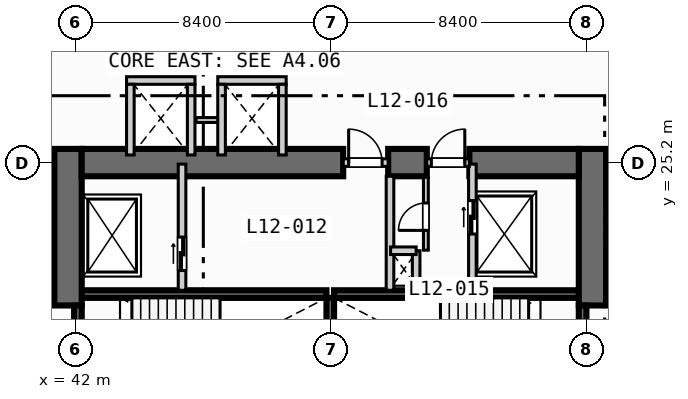
"""IFC4 building model, lengths in metres.
Left out: names, types, materials, properties, quantities, classifications, styles, units other than length and angle.
Written with IfcOpenShell. Run it as: python <this file> out.ifc"""

import sys

from ifc_helpers import new_model, si_unit, direction, frame, frame_2d, origin, place, context, subcontext, project, spatial, rectangle, extrude, element, fill, save


model = new_model("IFC4")
c1 = context("Model", 3, precision=1e-05, world=origin(), true_north=direction((0.0, 1.0)))
c2 = subcontext(c1, "Body", "Model", "MODEL_VIEW")
j1 = project(units=[si_unit("LENGTHUNIT", "METRE"), si_unit("PLANEANGLEUNIT", "RADIAN")], contexts=[c1])
p1 = place(None, origin())
s1 = spatial("IfcSite", under=j1, at=p1, CompositionType="ELEMENT")
p2 = place(p1, origin())
s2 = spatial("IfcBuilding", under=s1, at=p2, CompositionType="ELEMENT")
p3 = place(p2, frame((0.0, 0.0, 54.8)))
s3 = spatial("IfcBuildingStorey", under=s2, at=p3, CompositionType="ELEMENT", Elevation=54.8)
for number, where, z_axis, x_axis in (
    (1, (42.2, 20.875, 0.0), (0.0, 0.0, 1.0), (1.0, 0.0, 0.0)),
    (2, (50.5, 20.875, 0.0), (0.0, 0.0, 1.0), (1.0, 0.0, 0.0)),
):
    element("IfcWall", number, at=place(p3, frame(where, z_axis=z_axis, x_axis=x_axis)), inside=s3, PredefinedType="SOLIDWALL", context=c2, shape_type="SweptSolid", body=[
        extrude(rectangle(XDim=8.05, YDim=0.25, at=frame_2d((4.025, 0.0))), origin(), (0.0, 0.0, 1.0), 3.55),
    ])
p4 = place(p3, frame((50.375, 17.25, 0.0), z_axis=(0.0, 0.0, 1.0), x_axis=(0.0, 1.0, 0.0)))
e3 = element("IfcWall", 3, at=p4, inside=s3, PredefinedType="SOLIDWALL", context=c2, shape_type="SweptSolid", body=[
    extrude(rectangle(XDim=3.5, YDim=0.25, at=frame_2d((1.75, 0.0))), origin(), (0.0, 0.0, 1.0), 3.55),
])
for number, where, z_axis, x_axis in (
    (4, (41.75, 20.5, 0.0), (0.0, 0.0, 1.0), (0.0, 1.0, 0.0)),
    (5, (59.0, 20.5, 0.0), (0.0, 0.0, 1.0), (0.0, 1.0, 0.0)),
):
    element("IfcWall", number, at=place(p3, frame(where, z_axis=z_axis, x_axis=x_axis)), inside=s3, PredefinedType="SHEAR", context=c2, shape_type="SweptSolid", body=[
        extrude(rectangle(XDim=5.15, YDim=0.9, at=frame_2d((2.575, 0.0))), origin(), (0.0, 0.0, 1.0), 3.55),
    ])
p5 = place(p3, frame((42.2, 25.2, 0.0), z_axis=(0.0, 0.0, 1.0), x_axis=(1.0, 0.0, 0.0)))
e6 = element("IfcWall", 6, at=p5, inside=s3, PredefinedType="SHEAR", context=c2, shape_type="SweptSolid", body=[
    extrude(rectangle(XDim=8.6, YDim=0.9, at=frame_2d((4.3, 0.0))), origin(), (0.0, 0.0, 1.0), 3.55),
])
p6 = place(p3, frame((52.28, 25.2, 0.0), z_axis=(0.0, 0.0, 1.0), x_axis=(1.0, 0.0, 0.0)))
e7 = element("IfcWall", 7, at=p6, inside=s3, PredefinedType="SHEAR", context=c2, shape_type="SweptSolid", body=[
    extrude(rectangle(XDim=1.27, YDim=0.9, at=frame_2d((0.635, 0.0))), origin(), (0.0, 0.0, 1.0), 3.55),
])
p7 = place(p3, frame((54.95, 25.2, 0.0), z_axis=(0.0, 0.0, 1.0), x_axis=(1.0, 0.0, 0.0)))
e8 = element("IfcWall", 8, at=p7, inside=s3, PredefinedType="SHEAR", context=c2, shape_type="SweptSolid", body=[
    extrude(rectangle(XDim=3.6, YDim=0.9, at=frame_2d((1.8, 0.0))), origin(), (0.0, 0.0, 1.0), 3.55),
])
p8 = place(p3, frame((42.075, 18.0, 0.0), z_axis=(0.0, 0.0, 1.0), x_axis=(0.0, 1.0, 0.0)))
e9 = element("IfcWall", 9, at=p8, inside=s3, PredefinedType="SOLIDWALL", context=c2, shape_type="SweptSolid", body=[
    extrude(rectangle(XDim=2.5, YDim=0.25, at=frame_2d((1.25, 0.0))), origin(), (0.0, 0.0, 1.0), 3.55),
])
p9 = place(p8, frame((0.7, 0.0, 0.0)))
e10 = element("IfcOpeningElement", 10, at=p9, cuts=e9, PredefinedType="OPENING", context=c2, shape_type="SweptSolid", body=[
    extrude(rectangle(XDim=1.1, YDim=2.15, at=frame_2d((0.55, 1.075))), frame((0.0, 0.135, 0.0), z_axis=(0.0, -1.0, 0.0), x_axis=(1.0, 0.0, 0.0)), (0.0, 0.0, 1.0), 0.27),
])
p10 = place(p3, frame((58.675, 18.0, 0.0), z_axis=(0.0, 0.0, 1.0), x_axis=(0.0, 1.0, 0.0)))
e11 = element("IfcWall", 11, at=p10, inside=s3, PredefinedType="SOLIDWALL", context=c2, shape_type="SweptSolid", body=[
    extrude(rectangle(XDim=2.5, YDim=0.25, at=frame_2d((1.25, 0.0))), origin(), (0.0, 0.0, 1.0), 3.55),
])
p11 = place(p10, frame((0.7, 0.0, 0.0)))
e12 = element("IfcOpeningElement", 12, at=p11, cuts=e11, PredefinedType="OPENING", context=c2, shape_type="SweptSolid", body=[
    extrude(rectangle(XDim=1.1, YDim=2.15, at=frame_2d((0.55, 1.075))), frame((0.0, 0.135, 0.0), z_axis=(0.0, -1.0, 0.0), x_axis=(1.0, 0.0, 0.0)), (0.0, 0.0, 1.0), 0.27),
])
p12 = place(p3, frame((45.5, 21.0, 0.0), z_axis=(0.0, 0.0, 1.0), x_axis=(0.0, 1.0, 0.0)))
e13 = element("IfcWall", 13, at=p12, inside=s3, PredefinedType="SOLIDWALL", context=c2, shape_type="SweptSolid", body=[
    extrude(rectangle(XDim=4.15, YDim=0.25, at=frame_2d((2.075, 0.0))), origin(), (0.0, 0.0, 1.0), 3.55),
])
p13 = place(p12, frame((0.65, 0.0, 0.0)))
e14 = element("IfcOpeningElement", 14, at=p13, cuts=e13, PredefinedType="OPENING", context=c2, shape_type="SweptSolid", body=[
    extrude(rectangle(XDim=1.1, YDim=2.15, at=frame_2d((0.55, 1.075))), frame((0.0, 0.135, 0.0), z_axis=(0.0, -1.0, 0.0), x_axis=(1.0, 0.0, 0.0)), (0.0, 0.0, 1.0), 0.27),
])
p14 = place(p3, frame((50.8, 25.2, 0.0), z_axis=(0.0, 0.0, 1.0), x_axis=(1.0, 0.0, 0.0)))
e15 = element("IfcWall", 15, at=p14, inside=s3, PredefinedType="SOLIDWALL", context=c2, shape_type="SweptSolid", body=[
    extrude(rectangle(XDim=1.48, YDim=0.25, at=frame_2d((0.74, 0.0))), origin(), (0.0, 0.0, 1.0), 3.55),
])
p15 = place(p14, frame((0.18, 0.0, 0.0)))
e16 = element("IfcOpeningElement", 16, at=p15, cuts=e15, PredefinedType="OPENING", context=c2, shape_type="SweptSolid", body=[
    extrude(rectangle(XDim=1.1, YDim=2.15, at=frame_2d((0.55, 1.075))), frame((0.0, 0.135, 0.0), z_axis=(0.0, -1.0, 0.0), x_axis=(1.0, 0.0, 0.0)), (0.0, 0.0, 1.0), 0.27),
])
p16 = place(p3, frame((52.34, 21.0, 0.0), z_axis=(0.0, 0.0, 1.0), x_axis=(0.0, 1.0, 0.0)))
e17 = element("IfcWall", 17, at=p16, inside=s3, PredefinedType="SOLIDWALL", context=c2, shape_type="SweptSolid", body=[
    extrude(rectangle(XDim=3.75, YDim=0.25, at=frame_2d((1.875, 0.0))), origin(), (0.0, 0.0, 1.0), 3.55),
])
p17 = place(p3, frame((55.05, 21.0, 0.0), z_axis=(0.0, 0.0, 1.0), x_axis=(0.0, 1.0, 0.0)))
e18 = element("IfcWall", 18, at=p17, inside=s3, PredefinedType="SOLIDWALL", context=c2, shape_type="SweptSolid", body=[
    extrude(rectangle(XDim=4.15, YDim=0.25, at=frame_2d((2.075, 0.0))), origin(), (0.0, 0.0, 1.0), 3.55),
])
p18 = place(p17, frame((1.85, 0.0, 0.0)))
e19 = element("IfcOpeningElement", 19, at=p18, cuts=e18, PredefinedType="OPENING", context=c2, shape_type="SweptSolid", body=[
    extrude(rectangle(XDim=1.1, YDim=2.15, at=frame_2d((0.55, 1.075))), frame((0.0, 0.135, 0.0), z_axis=(0.0, -1.0, 0.0), x_axis=(1.0, 0.0, 0.0)), (0.0, 0.0, 1.0), 0.27),
])
p19 = place(p3, frame((53.55, 25.2, 0.0), z_axis=(0.0, 0.0, 1.0), x_axis=(1.0, 0.0, 0.0)))
e20 = element("IfcWall", 20, at=p19, inside=s3, PredefinedType="SOLIDWALL", context=c2, shape_type="SweptSolid", body=[
    extrude(rectangle(XDim=1.4, YDim=0.25, at=frame_2d((0.7, 0.0))), origin(), (0.0, 0.0, 1.0), 3.55),
])
p20 = place(p19, frame((0.15, 0.0, 0.0)))
e21 = element("IfcOpeningElement", 21, at=p20, cuts=e20, PredefinedType="OPENING", context=c2, shape_type="SweptSolid", body=[
    extrude(rectangle(XDim=1.1, YDim=2.15, at=frame_2d((0.55, 1.075))), frame((0.0, 0.135, 0.0), z_axis=(0.0, -1.0, 0.0), x_axis=(1.0, 0.0, 0.0)), (0.0, 0.0, 1.0), 0.27),
])
p21 = place(p3, frame((53.2, 21.0, 0.0), z_axis=(0.0, 0.0, 1.0), x_axis=(0.0, 1.0, 0.0)))
e22 = element("IfcWall", 22, at=p21, inside=s3, PredefinedType="SOLIDWALL", context=c2, shape_type="SweptSolid", body=[
    extrude(rectangle(XDim=1.3, YDim=0.25, at=frame_2d((0.65, 0.0))), origin(), (0.0, 0.0, 1.0), 3.55),
])
p22 = place(p3, frame((52.36, 22.3, 0.0), z_axis=(0.0, 0.0, 1.0), x_axis=(1.0, 0.0, 0.0)))
e23 = element("IfcWall", 23, at=p22, inside=s3, PredefinedType="SOLIDWALL", context=c2, shape_type="SweptSolid", body=[
    extrude(rectangle(XDim=0.84, YDim=0.25, at=frame_2d((0.42, 0.0))), origin(), (0.0, 0.0, 1.0), 3.55),
])
p23 = place(p3, frame((53.52, 22.32, 0.0), z_axis=(0.0, 0.0, 1.0), x_axis=(0.0, 1.0, 0.0)))
e24 = element("IfcWall", 24, at=p23, inside=s3, PredefinedType="PARTITIONING", context=c2, shape_type="SweptSolid", body=[
    extrude(rectangle(XDim=2.4, YDim=0.16, at=frame_2d((1.2, 0.0))), origin(), (0.0, 0.0, 1.0), 3.55),
])
p24 = place(p23, frame((0.65, 0.0, 0.0)))
e25 = element("IfcOpeningElement", 25, at=p24, cuts=e24, PredefinedType="OPENING", context=c2, shape_type="SweptSolid", body=[
    extrude(rectangle(XDim=0.9, YDim=2.1, at=frame_2d((0.45, 1.05))), frame((0.0, 0.09, 0.0), z_axis=(0.0, -1.0, 0.0), x_axis=(1.0, 0.0, 0.0)), (0.0, 0.0, 1.0), 0.18),
])
p25 = place(p3, frame((43.675, 27.9, 0.0), z_axis=(0.0, 0.0, 1.0), x_axis=(1.0, 0.0, 0.0)))
e26 = element("IfcWall", 26, at=p25, inside=s3, PredefinedType="SOLIDWALL", context=c2, shape_type="SweptSolid", body=[
    extrude(rectangle(XDim=2.25, YDim=0.25, at=frame_2d((1.125, 0.0))), origin(), (0.0, 0.0, 1.0), 3.55),
])
for number, where, z_axis, x_axis in (
    (27, (43.8, 25.45, 0.0), (0.0, 0.0, 1.0), (0.0, 1.0, 0.0)),
    (28, (45.8, 25.45, 0.0), (0.0, 0.0, 1.0), (0.0, 1.0, 0.0)),
):
    element("IfcWall", number, at=place(p3, frame(where, z_axis=z_axis, x_axis=x_axis)), inside=s3, PredefinedType="SOLIDWALL", context=c2, shape_type="SweptSolid", body=[
        extrude(rectangle(XDim=2.325, YDim=0.25, at=frame_2d((1.163, 0.0))), origin(), (0.0, 0.0, 1.0), 3.55),
    ])
p26 = place(p3, frame((45.96, 26.6, 0.0), z_axis=(0.0, 0.0, 1.0), x_axis=(1.0, 0.0, 0.0)))
e29 = element("IfcWall", 29, at=p26, inside=s3, PredefinedType="PARTITIONING", context=c2, shape_type="SweptSolid", body=[
    extrude(rectangle(XDim=0.88, YDim=0.16, at=frame_2d((0.44, 0.0))), origin(), (0.0, 0.0, 1.0), 3.55),
])
p27 = place(p3, frame((46.675, 27.9, 0.0), z_axis=(0.0, 0.0, 1.0), x_axis=(1.0, 0.0, 0.0)))
e30 = element("IfcWall", 30, at=p27, inside=s3, PredefinedType="SOLIDWALL", context=c2, shape_type="SweptSolid", body=[
    extrude(rectangle(XDim=2.25, YDim=0.25, at=frame_2d((1.125, 0.0))), origin(), (0.0, 0.0, 1.0), 3.55),
])
for number, where, z_axis, x_axis in (
    (31, (46.8, 25.45, 0.0), (0.0, 0.0, 1.0), (0.0, 1.0, 0.0)),
    (32, (48.8, 25.45, 0.0), (0.0, 0.0, 1.0), (0.0, 1.0, 0.0)),
):
    element("IfcWall", number, at=place(p3, frame(where, z_axis=z_axis, x_axis=x_axis)), inside=s3, PredefinedType="SOLIDWALL", context=c2, shape_type="SweptSolid", body=[
        extrude(rectangle(XDim=2.325, YDim=0.25, at=frame_2d((1.163, 0.0))), origin(), (0.0, 0.0, 1.0), 3.55),
    ])
p28 = place(p13, origin())
e33 = element("IfcDoor", 33, at=p28, inside=s3, OperationType="SLIDING_TO_LEFT", PredefinedType="DOOR", context=c2, shape_type="SweptSolid", body=[
    extrude(rectangle(XDim=1.1, YDim=2.15, at=frame_2d((0.55, 1.075))), frame((0.0, 0.025, 0.0), z_axis=(0.0, -1.0, 0.0), x_axis=(1.0, 0.0, 0.0)), (0.0, 0.0, 1.0), 0.05),
])
fill(e14, e33)
p29 = place(p15, origin())
e34 = element("IfcDoor", 34, at=p29, inside=s3, OperationType="SINGLE_SWING_LEFT", PredefinedType="DOOR", context=c2, shape_type="SweptSolid", body=[
    extrude(rectangle(XDim=1.1, YDim=2.15, at=frame_2d((0.55, 1.075))), frame((0.0, 0.025, 0.0), z_axis=(0.0, -1.0, 0.0), x_axis=(1.0, 0.0, 0.0)), (0.0, 0.0, 1.0), 0.05),
])
fill(e16, e34)
p30 = place(p18, origin())
e35 = element("IfcDoor", 35, at=p30, inside=s3, OperationType="SLIDING_TO_LEFT", PredefinedType="DOOR", context=c2, shape_type="SweptSolid", body=[
    extrude(rectangle(XDim=1.1, YDim=2.15, at=frame_2d((0.55, 1.075))), frame((0.0, 0.025, 0.0), z_axis=(0.0, -1.0, 0.0), x_axis=(1.0, 0.0, 0.0)), (0.0, 0.0, 1.0), 0.05),
])
fill(e19, e35)
p31 = place(p20, origin())
e36 = element("IfcDoor", 36, at=p31, inside=s3, OperationType="SINGLE_SWING_RIGHT", PredefinedType="DOOR", context=c2, shape_type="SweptSolid", body=[
    extrude(rectangle(XDim=1.1, YDim=2.15, at=frame_2d((0.55, 1.075))), frame((0.0, 0.025, 0.0), z_axis=(0.0, -1.0, 0.0), x_axis=(1.0, 0.0, 0.0)), (0.0, 0.0, 1.0), 0.05),
])
fill(e21, e36)
p32 = place(p24, origin())
e37 = element("IfcDoor", 37, at=p32, inside=s3, OperationType="SINGLE_SWING_LEFT", PredefinedType="DOOR", context=c2, shape_type="SweptSolid", body=[
    extrude(rectangle(XDim=0.9, YDim=2.1, at=frame_2d((0.45, 1.05))), frame((0.0, 0.025, 0.0), z_axis=(0.0, -1.0, 0.0), x_axis=(1.0, 0.0, 0.0)), (0.0, 0.0, 1.0), 0.05),
])
fill(e25, e37)
save(model, sys.argv[1])
